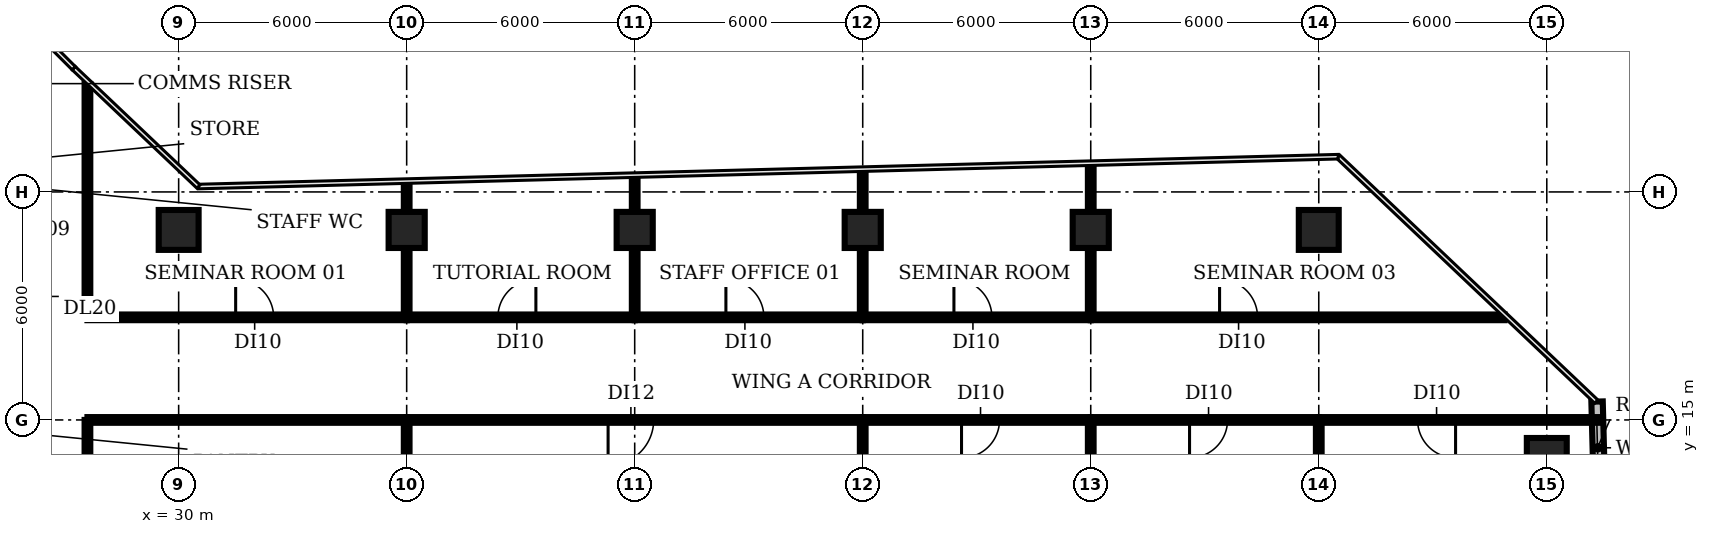
"""IFC4 building model, lengths in metres.
Left out: names, types, materials, properties, quantities, classifications, styles, units other than length and angle.
Written with IfcOpenShell. Run it as: python <this file> out.ifc"""

import sys

from ifc_helpers import new_model, si_unit, direction, frame, frame_2d, origin, origin_2d, place, context, subcontext, project, spatial, rectangle, circle, extrude, element, fill, save


model = new_model("IFC4")
c1 = context("Model", 3, precision=1e-05, world=origin(), true_north=direction((0.0, 1.0)))
c2 = subcontext(c1, "Body", "Model", "MODEL_VIEW")
j1 = project(units=[si_unit("LENGTHUNIT", "METRE"), si_unit("PLANEANGLEUNIT", "RADIAN")], contexts=[c1])
p1 = place(None, origin())
s1 = spatial("IfcSite", under=j1, at=p1, CompositionType="ELEMENT")
p2 = place(p1, origin())
s2 = spatial("IfcBuilding", under=s1, at=p2, CompositionType="ELEMENT")
p3 = place(p2, frame((0.0, 0.0, 58.4)))
s3 = spatial("IfcBuildingStorey", under=s2, at=p3, CompositionType="ELEMENT", Elevation=58.4)
p4 = place(p3, frame((30.0, 20.0, 0.0), z_axis=(0.0, 0.0, 1.0), x_axis=(1.0, 0.0, 0.0)))
e1 = element("IfcColumn", 1, at=p4, inside=s3, PredefinedType="COLUMN", context=c2, shape_type="SweptSolid", body=[
    extrude(circle(Radius=0.525, at=origin_2d()), origin(), (0.0, 0.0, 1.0), 3.85),
])
for number, where, z_axis, x_axis in (
    (2, (36.0, 20.0, 0.0), (0.0, 0.0, 1.0), (1.0, 0.0, 0.0)),
    (3, (42.0, 20.0, 0.0), (0.0, 0.0, 1.0), (1.0, 0.0, 0.0)),
    (4, (48.0, 20.0, 0.0), (0.0, 0.0, 1.0), (1.0, 0.0, 0.0)),
    (5, (54.0, 20.0, 0.0), (0.0, 0.0, 1.0), (1.0, 0.0, 0.0)),
):
    element("IfcColumn", number, at=place(p3, frame(where, z_axis=z_axis, x_axis=x_axis)), inside=s3, PredefinedType="COLUMN", context=c2, shape_type="SweptSolid", body=[
        extrude(rectangle(XDim=0.95, YDim=0.95, at=origin_2d()), origin(), (0.0, 0.0, 1.0), 3.85),
    ])
for number, where, z_axis, x_axis in (
    (6, (60.0, 20.0, 0.0), (0.0, 0.0, 1.0), (1.0, 0.0, 0.0)),
    (7, (66.0, 14.0, 0.0), (0.0, 0.0, 1.0), (1.0, 0.0, 0.0)),
):
    element("IfcColumn", number, at=place(p3, frame(where, z_axis=z_axis, x_axis=x_axis)), inside=s3, PredefinedType="COLUMN", context=c2, shape_type="SweptSolid", body=[
        extrude(circle(Radius=0.525, at=origin_2d()), origin(), (0.0, 0.0, 1.0), 3.85),
    ])
p5 = place(p3, frame((67.387, 13.051, 0.0), z_axis=(0.0, 0.0, 1.0), x_axis=(-0.026187944058, 0.999657036981, 0.0)))
e8 = element("IfcWall", 8, at=p5, inside=s3, PredefinedType="SOLIDWALL", context=c2, shape_type="SweptSolid", body=[
    extrude(rectangle(XDim=2.433, YDim=0.3, at=frame_2d((1.217, 0.0))), origin(), (0.0, 0.0, 1.0), 3.85),
])
p6 = place(p3, frame((27.6, 15.0, 0.0), z_axis=(0.0, 0.0, 1.0), x_axis=(0.0, -1.0, 0.0)))
e9 = element("IfcWall", 9, at=p6, inside=s3, PredefinedType="PARTITIONING", context=c2, shape_type="SweptSolid", body=[
    extrude(rectangle(XDim=10.5, YDim=0.15, at=frame_2d((5.25, 0.0))), origin(), (0.0, 0.0, 1.0), 2.83),
])
p7 = place(p6, frame((4.8, 0.0, 0.0)))
e10 = element("IfcOpeningElement", 10, at=p7, cuts=e9, PredefinedType="OPENING", context=c2, shape_type="SweptSolid", body=[
    extrude(rectangle(XDim=1.0, YDim=2.1, at=frame_2d((0.5, 1.05))), frame((0.0, 0.085, 0.0), z_axis=(0.0, -1.0, 0.0), x_axis=(1.0, 0.0, 0.0)), (0.0, 0.0, 1.0), 0.17),
])
p8 = place(p3, frame((27.6, 15.0, 0.0), z_axis=(0.0, 0.0, 1.0), x_axis=(1.0, 0.0, 0.0)))
e11 = element("IfcWall", 11, at=p8, inside=s3, PredefinedType="PARTITIONING", context=c2, shape_type="SweptSolid", body=[
    extrude(rectangle(XDim=8.4, YDim=0.15, at=frame_2d((4.2, 0.0))), origin(), (0.0, 0.0, 1.0), 2.83),
])
p9 = place(p3, frame((27.6, 17.7, 0.0), z_axis=(0.0, 0.0, 1.0), x_axis=(0.0, 1.0, 0.0)))
e12 = element("IfcWall", 12, at=p9, inside=s3, PredefinedType="PARTITIONING", context=c2, shape_type="SweptSolid", body=[
    extrude(rectangle(XDim=6.14, YDim=0.15, at=frame_2d((3.07, 0.0))), origin(), (0.0, 0.0, 1.0), 2.83),
])
p10 = place(p3, frame((27.6, 17.7, 0.0), z_axis=(0.0, 0.0, 1.0), x_axis=(1.0, 0.0, 0.0)))
e13 = element("IfcWall", 13, at=p10, inside=s3, PredefinedType="PARTITIONING", context=c2, shape_type="SweptSolid", body=[
    extrude(rectangle(XDim=8.4, YDim=0.15, at=frame_2d((4.2, 0.0))), origin(), (0.0, 0.0, 1.0), 2.83),
])
p11 = place(p10, frame((3.9, 0.0, 0.0)))
e14 = element("IfcOpeningElement", 14, at=p11, cuts=e13, PredefinedType="OPENING", context=c2, shape_type="SweptSolid", body=[
    extrude(rectangle(XDim=1.0, YDim=2.1, at=frame_2d((0.5, 1.05))), frame((0.0, 0.085, 0.0), z_axis=(0.0, -1.0, 0.0), x_axis=(1.0, 0.0, 0.0)), (0.0, 0.0, 1.0), 0.17),
])
p12 = place(p3, frame((36.0, -5.01, 0.0), z_axis=(0.0, 0.0, 1.0), x_axis=(0.0, 1.0, 0.0)))
e15 = element("IfcWall", 15, at=p12, inside=s3, PredefinedType="PARTITIONING", context=c2, shape_type="SweptSolid", body=[
    extrude(rectangle(XDim=20.01, YDim=0.15, at=frame_2d((10.005, 0.0))), origin(), (0.0, 0.0, 1.0), 2.83),
])
p13 = place(p3, frame((36.0, 17.7, 0.0), z_axis=(0.0, 0.0, 1.0), x_axis=(0.0, 1.0, 0.0)))
e16 = element("IfcWall", 16, at=p13, inside=s3, PredefinedType="PARTITIONING", context=c2, shape_type="SweptSolid", body=[
    extrude(rectangle(XDim=3.54, YDim=0.15, at=frame_2d((1.77, 0.0))), origin(), (0.0, 0.0, 1.0), 2.83),
])
p14 = place(p3, frame((36.0, 17.7, 0.0), z_axis=(0.0, 0.0, 1.0), x_axis=(1.0, 0.0, 0.0)))
e17 = element("IfcWall", 17, at=p14, inside=s3, PredefinedType="PARTITIONING", context=c2, shape_type="SweptSolid", body=[
    extrude(rectangle(XDim=6.0, YDim=0.15, at=frame_2d((3.0, 0.0))), origin(), (0.0, 0.0, 1.0), 2.83),
])
p15 = place(p14, frame((2.4, 0.0, 0.0)))
e18 = element("IfcOpeningElement", 18, at=p15, cuts=e17, PredefinedType="OPENING", context=c2, shape_type="SweptSolid", body=[
    extrude(rectangle(XDim=1.0, YDim=2.1, at=frame_2d((0.5, 1.05))), frame((0.0, 0.085, 0.0), z_axis=(0.0, -1.0, 0.0), x_axis=(1.0, 0.0, 0.0)), (0.0, 0.0, 1.0), 0.17),
])
p16 = place(p3, frame((42.0, 17.7, 0.0), z_axis=(0.0, 0.0, 1.0), x_axis=(0.0, 1.0, 0.0)))
e19 = element("IfcWall", 19, at=p16, inside=s3, PredefinedType="PARTITIONING", context=c2, shape_type="SweptSolid", body=[
    extrude(rectangle(XDim=3.69, YDim=0.15, at=frame_2d((1.845, 0.0))), origin(), (0.0, 0.0, 1.0), 2.83),
])
p17 = place(p3, frame((42.0, 17.7, 0.0), z_axis=(0.0, 0.0, 1.0), x_axis=(1.0, 0.0, 0.0)))
e20 = element("IfcWall", 20, at=p17, inside=s3, PredefinedType="PARTITIONING", context=c2, shape_type="SweptSolid", body=[
    extrude(rectangle(XDim=6.0, YDim=0.15, at=frame_2d((3.0, 0.0))), origin(), (0.0, 0.0, 1.0), 2.83),
])
p18 = place(p17, frame((2.4, 0.0, 0.0)))
e21 = element("IfcOpeningElement", 21, at=p18, cuts=e20, PredefinedType="OPENING", context=c2, shape_type="SweptSolid", body=[
    extrude(rectangle(XDim=1.0, YDim=2.1, at=frame_2d((0.5, 1.05))), frame((0.0, 0.085, 0.0), z_axis=(0.0, -1.0, 0.0), x_axis=(1.0, 0.0, 0.0)), (0.0, 0.0, 1.0), 0.17),
])
p19 = place(p3, frame((48.0, -5.01, 0.0), z_axis=(0.0, 0.0, 1.0), x_axis=(0.0, 1.0, 0.0)))
e22 = element("IfcWall", 22, at=p19, inside=s3, PredefinedType="PARTITIONING", context=c2, shape_type="SweptSolid", body=[
    extrude(rectangle(XDim=20.01, YDim=0.15, at=frame_2d((10.005, 0.0))), origin(), (0.0, 0.0, 1.0), 2.83),
])
p20 = place(p3, frame((48.0, 15.0, 0.0), z_axis=(0.0, 0.0, 1.0), x_axis=(-1.0, 0.0, 0.0)))
e23 = element("IfcWall", 23, at=p20, inside=s3, PredefinedType="PARTITIONING", context=c2, shape_type="SweptSolid", body=[
    extrude(rectangle(XDim=12.0, YDim=0.15, at=frame_2d((6.0, 0.0))), origin(), (0.0, 0.0, 1.0), 2.83),
])
p21 = place(p20, frame((5.5, 0.0, 0.0)))
e24 = element("IfcOpeningElement", 24, at=p21, cuts=e23, PredefinedType="OPENING", context=c2, shape_type="SweptSolid", body=[
    extrude(rectangle(XDim=1.2, YDim=2.1, at=frame_2d((0.6, 1.05))), frame((0.0, 0.085, 0.0), z_axis=(0.0, -1.0, 0.0), x_axis=(1.0, 0.0, 0.0)), (0.0, 0.0, 1.0), 0.17),
])
p22 = place(p3, frame((48.0, 17.7, 0.0), z_axis=(0.0, 0.0, 1.0), x_axis=(0.0, 1.0, 0.0)))
e25 = element("IfcWall", 25, at=p22, inside=s3, PredefinedType="PARTITIONING", context=c2, shape_type="SweptSolid", body=[
    extrude(rectangle(XDim=3.85, YDim=0.15, at=frame_2d((1.925, 0.0))), origin(), (0.0, 0.0, 1.0), 2.83),
])
p23 = place(p3, frame((48.0, 17.7, 0.0), z_axis=(0.0, 0.0, 1.0), x_axis=(1.0, 0.0, 0.0)))
e26 = element("IfcWall", 26, at=p23, inside=s3, PredefinedType="PARTITIONING", context=c2, shape_type="SweptSolid", body=[
    extrude(rectangle(XDim=6.0, YDim=0.15, at=frame_2d((3.0, 0.0))), origin(), (0.0, 0.0, 1.0), 2.83),
])
p24 = place(p23, frame((2.4, 0.0, 0.0)))
e27 = element("IfcOpeningElement", 27, at=p24, cuts=e26, PredefinedType="OPENING", context=c2, shape_type="SweptSolid", body=[
    extrude(rectangle(XDim=1.0, YDim=2.1, at=frame_2d((0.5, 1.05))), frame((0.0, 0.085, 0.0), z_axis=(0.0, -1.0, 0.0), x_axis=(1.0, 0.0, 0.0)), (0.0, 0.0, 1.0), 0.17),
])
p25 = place(p3, frame((54.0, -4.993, 0.0), z_axis=(0.0, 0.0, 1.0), x_axis=(0.0, 1.0, 0.0)))
e28 = element("IfcWall", 28, at=p25, inside=s3, PredefinedType="PARTITIONING", context=c2, shape_type="SweptSolid", body=[
    extrude(rectangle(XDim=19.993, YDim=0.15, at=frame_2d((9.997, 0.0))), origin(), (0.0, 0.0, 1.0), 2.83),
])
p26 = place(p3, frame((54.0, 15.0, 0.0), z_axis=(0.0, 0.0, 1.0), x_axis=(-1.0, 0.0, 0.0)))
e29 = element("IfcWall", 29, at=p26, inside=s3, PredefinedType="PARTITIONING", context=c2, shape_type="SweptSolid", body=[
    extrude(rectangle(XDim=6.0, YDim=0.15, at=frame_2d((3.0, 0.0))), origin(), (0.0, 0.0, 1.0), 2.83),
])
p27 = place(p26, frame((2.4, 0.0, 0.0)))
e30 = element("IfcOpeningElement", 30, at=p27, cuts=e29, PredefinedType="OPENING", context=c2, shape_type="SweptSolid", body=[
    extrude(rectangle(XDim=1.0, YDim=2.1, at=frame_2d((0.5, 1.05))), frame((0.0, 0.085, 0.0), z_axis=(0.0, -1.0, 0.0), x_axis=(1.0, 0.0, 0.0)), (0.0, 0.0, 1.0), 0.17),
])
p28 = place(p3, frame((54.0, 17.7, 0.0), z_axis=(0.0, 0.0, 1.0), x_axis=(0.0, 1.0, 0.0)))
e31 = element("IfcWall", 31, at=p28, inside=s3, PredefinedType="PARTITIONING", context=c2, shape_type="SweptSolid", body=[
    extrude(rectangle(XDim=4.01, YDim=0.15, at=frame_2d((2.005, 0.0))), origin(), (0.0, 0.0, 1.0), 2.83),
])
p29 = place(p3, frame((54.0, 17.7, 0.0), z_axis=(0.0, 0.0, 1.0), x_axis=(1.0, 0.0, 0.0)))
e32 = element("IfcWall", 32, at=p29, inside=s3, PredefinedType="PARTITIONING", context=c2, shape_type="SweptSolid", body=[
    extrude(rectangle(XDim=10.89, YDim=0.15, at=frame_2d((5.445, 0.0))), origin(), (0.0, 0.0, 1.0), 2.83),
])
p30 = place(p29, frame((3.39, 0.0, 0.0)))
e33 = element("IfcOpeningElement", 33, at=p30, cuts=e32, PredefinedType="OPENING", context=c2, shape_type="SweptSolid", body=[
    extrude(rectangle(XDim=1.0, YDim=2.1, at=frame_2d((0.5, 1.05))), frame((0.0, 0.085, 0.0), z_axis=(0.0, -1.0, 0.0), x_axis=(1.0, 0.0, 0.0)), (0.0, 0.0, 1.0), 0.17),
])
p31 = place(p3, frame((60.0, -5.01, 0.0), z_axis=(0.0, 0.0, 1.0), x_axis=(0.0, 1.0, 0.0)))
e34 = element("IfcWall", 34, at=p31, inside=s3, PredefinedType="PARTITIONING", context=c2, shape_type="SweptSolid", body=[
    extrude(rectangle(XDim=20.01, YDim=0.15, at=frame_2d((10.005, 0.0))), origin(), (0.0, 0.0, 1.0), 2.83),
])
p32 = place(p3, frame((60.0, 15.0, 0.0), z_axis=(0.0, 0.0, 1.0), x_axis=(-1.0, 0.0, 0.0)))
e35 = element("IfcWall", 35, at=p32, inside=s3, PredefinedType="PARTITIONING", context=c2, shape_type="SweptSolid", body=[
    extrude(rectangle(XDim=6.0, YDim=0.15, at=frame_2d((3.0, 0.0))), origin(), (0.0, 0.0, 1.0), 2.83),
])
p33 = place(p32, frame((2.4, 0.0, 0.0)))
e36 = element("IfcOpeningElement", 36, at=p33, cuts=e35, PredefinedType="OPENING", context=c2, shape_type="SweptSolid", body=[
    extrude(rectangle(XDim=1.0, YDim=2.1, at=frame_2d((0.5, 1.05))), frame((0.0, 0.085, 0.0), z_axis=(0.0, -1.0, 0.0), x_axis=(1.0, 0.0, 0.0)), (0.0, 0.0, 1.0), 0.17),
])
p34 = place(p3, frame((67.375, 15.0, 0.0), z_axis=(0.0, 0.0, 1.0), x_axis=(-1.0, 0.0, 0.0)))
e37 = element("IfcWall", 37, at=p34, inside=s3, PredefinedType="PARTITIONING", context=c2, shape_type="SweptSolid", body=[
    extrude(rectangle(XDim=7.375, YDim=0.15, at=frame_2d((3.688, 0.0))), origin(), (0.0, 0.0, 1.0), 2.83),
])
p35 = place(p34, frame((3.775, 0.0, 0.0)))
e38 = element("IfcOpeningElement", 38, at=p35, cuts=e37, PredefinedType="OPENING", context=c2, shape_type="SweptSolid", body=[
    extrude(rectangle(XDim=1.0, YDim=2.1, at=frame_2d((0.5, 1.05))), frame((0.0, 0.085, 0.0), z_axis=(0.0, -1.0, 0.0), x_axis=(1.0, 0.0, 0.0)), (0.0, 0.0, 1.0), 0.17),
])
p36 = place(p11, origin())
e39 = element("IfcDoor", 39, at=p36, inside=s3, OperationType="SINGLE_SWING_LEFT", PredefinedType="DOOR", context=c2, shape_type="SweptSolid", body=[
    extrude(rectangle(XDim=1.0, YDim=2.1, at=frame_2d((0.5, 1.05))), frame((0.0, 0.025, 0.0), z_axis=(0.0, -1.0, 0.0), x_axis=(1.0, 0.0, 0.0)), (0.0, 0.0, 1.0), 0.05),
])
fill(e14, e39)
p37 = place(p15, origin())
e40 = element("IfcDoor", 40, at=p37, inside=s3, OperationType="SINGLE_SWING_RIGHT", PredefinedType="DOOR", context=c2, shape_type="SweptSolid", body=[
    extrude(rectangle(XDim=1.0, YDim=2.1, at=frame_2d((0.5, 1.05))), frame((0.0, 0.025, 0.0), z_axis=(0.0, -1.0, 0.0), x_axis=(1.0, 0.0, 0.0)), (0.0, 0.0, 1.0), 0.05),
])
fill(e18, e40)
p38 = place(p18, origin())
e41 = element("IfcDoor", 41, at=p38, inside=s3, OperationType="SINGLE_SWING_LEFT", PredefinedType="DOOR", context=c2, shape_type="SweptSolid", body=[
    extrude(rectangle(XDim=1.0, YDim=2.1, at=frame_2d((0.5, 1.05))), frame((0.0, 0.025, 0.0), z_axis=(0.0, -1.0, 0.0), x_axis=(1.0, 0.0, 0.0)), (0.0, 0.0, 1.0), 0.05),
])
fill(e21, e41)
p39 = place(p21, origin())
e42 = element("IfcDoor", 42, at=p39, inside=s3, OperationType="SINGLE_SWING_RIGHT", PredefinedType="DOOR", context=c2, shape_type="SweptSolid", body=[
    extrude(rectangle(XDim=1.2, YDim=2.1, at=frame_2d((0.6, 1.05))), frame((0.0, 0.025, 0.0), z_axis=(0.0, -1.0, 0.0), x_axis=(1.0, 0.0, 0.0)), (0.0, 0.0, 1.0), 0.05),
])
fill(e24, e42)
p40 = place(p24, origin())
e43 = element("IfcDoor", 43, at=p40, inside=s3, OperationType="SINGLE_SWING_LEFT", PredefinedType="DOOR", context=c2, shape_type="SweptSolid", body=[
    extrude(rectangle(XDim=1.0, YDim=2.1, at=frame_2d((0.5, 1.05))), frame((0.0, 0.025, 0.0), z_axis=(0.0, -1.0, 0.0), x_axis=(1.0, 0.0, 0.0)), (0.0, 0.0, 1.0), 0.05),
])
fill(e27, e43)
p41 = place(p27, origin())
e44 = element("IfcDoor", 44, at=p41, inside=s3, OperationType="SINGLE_SWING_RIGHT", PredefinedType="DOOR", context=c2, shape_type="SweptSolid", body=[
    extrude(rectangle(XDim=1.0, YDim=2.1, at=frame_2d((0.5, 1.05))), frame((0.0, 0.025, 0.0), z_axis=(0.0, -1.0, 0.0), x_axis=(1.0, 0.0, 0.0)), (0.0, 0.0, 1.0), 0.05),
])
fill(e30, e44)
p42 = place(p30, origin())
e45 = element("IfcDoor", 45, at=p42, inside=s3, OperationType="SINGLE_SWING_LEFT", PredefinedType="DOOR", context=c2, shape_type="SweptSolid", body=[
    extrude(rectangle(XDim=1.0, YDim=2.1, at=frame_2d((0.5, 1.05))), frame((0.0, 0.025, 0.0), z_axis=(0.0, -1.0, 0.0), x_axis=(1.0, 0.0, 0.0)), (0.0, 0.0, 1.0), 0.05),
])
fill(e33, e45)
p43 = place(p33, origin())
e46 = element("IfcDoor", 46, at=p43, inside=s3, OperationType="SINGLE_SWING_RIGHT", PredefinedType="DOOR", context=c2, shape_type="SweptSolid", body=[
    extrude(rectangle(XDim=1.0, YDim=2.1, at=frame_2d((0.5, 1.05))), frame((0.0, 0.025, 0.0), z_axis=(0.0, -1.0, 0.0), x_axis=(1.0, 0.0, 0.0)), (0.0, 0.0, 1.0), 0.05),
])
fill(e36, e46)
p44 = place(p35, origin())
e47 = element("IfcDoor", 47, at=p44, inside=s3, OperationType="SINGLE_SWING_LEFT", PredefinedType="DOOR", context=c2, shape_type="SweptSolid", body=[
    extrude(rectangle(XDim=1.0, YDim=2.1, at=frame_2d((0.5, 1.05))), frame((0.0, 0.025, 0.0), z_axis=(0.0, -1.0, 0.0), x_axis=(1.0, 0.0, 0.0)), (0.0, 0.0, 1.0), 0.05),
])
fill(e38, e47)
save(model, sys.argv[1])
